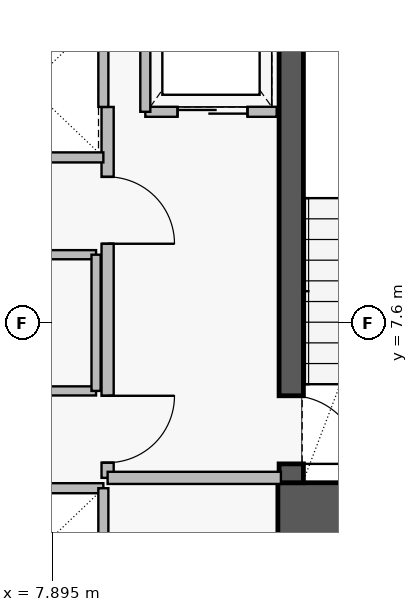
"""IFC4 building model, lengths in metres.
Left out: names, types, materials, properties, quantities, classifications, styles, units other than length and angle.
Written with IfcOpenShell. Run it as: python <this file> out.ifc"""

import sys

from ifc_helpers import new_model, si_unit, direction, frame, frame_2d, origin, place, context, subcontext, project, spatial, rectangle, extrude, element, fill, save


model = new_model("IFC4")
c1 = context("Model", 3, precision=1e-05, world=origin(), true_north=direction((0.0, 1.0)))
c2 = subcontext(c1, "Body", "Model", "MODEL_VIEW")
j1 = project(units=[si_unit("LENGTHUNIT", "METRE"), si_unit("PLANEANGLEUNIT", "RADIAN")], contexts=[c1])
p1 = place(None, origin())
s1 = spatial("IfcSite", under=j1, at=p1, CompositionType="ELEMENT")
p2 = place(p1, origin())
s2 = spatial("IfcBuilding", under=s1, at=p2, CompositionType="ELEMENT")
p3 = place(p2, frame((0.0, 0.0, 38.55)))
s3 = spatial("IfcBuildingStorey", under=s2, at=p3, CompositionType="ELEMENT", Elevation=38.55)
p4 = place(p3, frame((11.6, 4.52, 0.0), z_axis=(0.0, 0.0, 1.0), x_axis=(1.0, 0.0, 0.0)))
e1 = element("IfcWall", 1, at=p4, inside=s3, PredefinedType="SHEAR", context=c2, shape_type="SweptSolid", body=[
    extrude(rectangle(XDim=4.71, YDim=0.9, at=frame_2d((2.355, 0.0))), origin(), (0.0, 0.0, 1.0), 3.46),
])
p5 = place(p3, frame((11.82, 13.93, 0.0), z_axis=(0.0, 0.0, 1.0), x_axis=(0.0, -1.0, 0.0)))
e2 = element("IfcWall", 2, at=p5, inside=s3, PredefinedType="SHEAR", context=c2, shape_type="SweptSolid", body=[
    extrude(rectangle(XDim=8.96, YDim=0.4, at=frame_2d((4.48, 0.0))), origin(), (0.0, 0.0, 1.0), 3.46),
])
p6 = place(p5, frame((7.53, 0.0, 0.0)))
e3 = element("IfcOpeningElement", 3, at=p6, cuts=e2, PredefinedType="OPENING", context=c2, shape_type="SweptSolid", body=[
    extrude(rectangle(XDim=1.12, YDim=2.22, at=frame_2d((0.56, 1.11))), frame((0.0, 0.21, 0.0), z_axis=(0.0, -1.0, 0.0), x_axis=(1.0, 0.0, 0.0)), (0.0, 0.0, 1.0), 0.42),
])
p7 = place(p3, frame((8.8, 11.15, 0.0), z_axis=(0.0, 0.0, 1.0), x_axis=(0.0, -1.0, 0.0)))
e4 = element("IfcWall", 4, at=p7, inside=s3, PredefinedType="PARTITIONING", context=c2, shape_type="SweptSolid", body=[
    extrude(rectangle(XDim=6.1, YDim=0.2, at=frame_2d((3.05, 0.0))), origin(), (0.0, 0.0, 1.0), 3.43),
])
p8 = place(p7, frame((1.15, 0.0, 0.0)))
e5 = element("IfcOpeningElement", 5, at=p8, cuts=e4, PredefinedType="OPENING", context=c2, shape_type="SweptSolid", body=[
    extrude(rectangle(XDim=1.1, YDim=2.2, at=frame_2d((0.55, 1.1))), frame((0.0, 0.11, 0.0), z_axis=(0.0, -1.0, 0.0), x_axis=(1.0, 0.0, 0.0)), (0.0, 0.0, 1.0), 0.22),
])
p9 = place(p7, frame((4.75, 0.0, 0.0)))
e6 = element("IfcOpeningElement", 6, at=p9, cuts=e4, PredefinedType="OPENING", context=c2, shape_type="SweptSolid", body=[
    extrude(rectangle(XDim=1.1, YDim=2.2, at=frame_2d((0.55, 1.1))), frame((0.0, 0.11, 0.0), z_axis=(0.0, -1.0, 0.0), x_axis=(1.0, 0.0, 0.0)), (0.0, 0.0, 1.0), 0.22),
])
p10 = place(p3, frame((9.42, 11.07, 0.0), z_axis=(0.0, 0.0, 1.0), x_axis=(1.0, 0.0, 0.0)))
e7 = element("IfcWall", 7, at=p10, inside=s3, PredefinedType="PARTITIONING", context=c2, shape_type="SweptSolid", body=[
    extrude(rectangle(XDim=2.16, YDim=0.165, at=frame_2d((1.08, 0.0))), origin(), (0.0, 0.0, 1.0), 3.43),
])
p11 = place(p10, frame((0.53, 0.0, 0.0)))
e8 = element("IfcOpeningElement", 8, at=p11, cuts=e7, PredefinedType="OPENING", context=c2, shape_type="SweptSolid", body=[
    extrude(rectangle(XDim=1.15, YDim=2.25, at=frame_2d((0.575, 1.125))), frame((0.0, 0.093, 0.0), z_axis=(0.0, -1.0, 0.0), x_axis=(1.0, 0.0, 0.0)), (0.0, 0.0, 1.0), 0.185),
])
p12 = place(p3, frame((6.14, 8.72, 0.0), z_axis=(0.0, 0.0, 1.0), x_axis=(1.0, 0.0, 0.0)))
e9 = element("IfcWall", 9, at=p12, inside=s3, PredefinedType="PARTITIONING", context=c2, shape_type="SweptSolid", body=[
    extrude(rectangle(XDim=2.47, YDim=0.15, at=frame_2d((1.235, 0.0))), origin(), (0.0, 0.0, 1.0), 3.43),
])
p13 = place(p12, frame((0.785, 0.0, 0.0)))
e10 = element("IfcOpeningElement", 10, at=p13, cuts=e9, PredefinedType="OPENING", context=c2, shape_type="SweptSolid", body=[
    extrude(rectangle(XDim=0.9, YDim=2.15, at=frame_2d((0.45, 1.075))), frame((0.0, 0.085, 0.0), z_axis=(0.0, -1.0, 0.0), x_axis=(1.0, 0.0, 0.0)), (0.0, 0.0, 1.0), 0.17),
])
p14 = place(p3, frame((8.8, 5.05, 0.0), z_axis=(0.0, 0.0, 1.0), x_axis=(1.0, 0.0, 0.0)))
e11 = element("IfcWall", 11, at=p14, inside=s3, PredefinedType="PARTITIONING", context=c2, shape_type="SweptSolid", body=[
    extrude(rectangle(XDim=2.85, YDim=0.2, at=frame_2d((1.425, 0.0))), origin(), (0.0, 0.0, 1.0), 3.43),
])
p15 = place(p3, frame((9.42, 11.07, 0.0), z_axis=(0.0, 0.0, 1.0), x_axis=(0.0, 1.0, 0.0)))
e12 = element("IfcWall", 12, at=p15, inside=s3, PredefinedType="PARTITIONING", context=c2, shape_type="SweptSolid", body=[
    extrude(rectangle(XDim=2.96, YDim=0.165, at=frame_2d((1.48, 0.0))), origin(), (0.0, 0.0, 1.0), 3.43),
])
p16 = place(p3, frame((6.25, 4.88, 0.0), z_axis=(0.0, 0.0, 1.0), x_axis=(1.0, 0.0, 0.0)))
e13 = element("IfcWall", 13, at=p16, inside=s3, PredefinedType="PARTITIONING", context=c2, shape_type="SweptSolid", body=[
    extrude(rectangle(XDim=2.48, YDim=0.165, at=frame_2d((1.24, 0.0))), origin(), (0.0, 0.0, 1.0), 3.43),
])
p17 = place(p3, frame((8.73, 2.52, 0.0), z_axis=(0.0, 0.0, 1.0), x_axis=(0.0, 1.0, 0.0)))
e14 = element("IfcWall", 14, at=p17, inside=s3, PredefinedType="PARTITIONING", context=c2, shape_type="SweptSolid", body=[
    extrude(rectangle(XDim=2.36, YDim=0.165, at=frame_2d((1.18, 0.0))), origin(), (0.0, 0.0, 1.0), 3.43),
])
p18 = place(p3, frame((6.25, 10.32, 0.0), z_axis=(0.0, 0.0, 1.0), x_axis=(1.0, 0.0, 0.0)))
e15 = element("IfcWall", 15, at=p18, inside=s3, PredefinedType="PARTITIONING", context=c2, shape_type="SweptSolid", body=[
    extrude(rectangle(XDim=2.48, YDim=0.165, at=frame_2d((1.24, 0.0))), origin(), (0.0, 0.0, 1.0), 3.43),
])
p19 = place(p3, frame((8.73, 11.15, 0.0), z_axis=(0.0, 0.0, 1.0), x_axis=(0.0, 1.0, 0.0)))
e16 = element("IfcWall", 16, at=p19, inside=s3, PredefinedType="PARTITIONING", context=c2, shape_type="SweptSolid", body=[
    extrude(rectangle(XDim=1.53, YDim=0.165, at=frame_2d((0.765, 0.0))), origin(), (0.0, 0.0, 1.0), 3.43),
])
p20 = place(p3, frame((6.14, 6.48, 0.0), z_axis=(0.0, 0.0, 1.0), x_axis=(1.0, 0.0, 0.0)))
e17 = element("IfcWall", 17, at=p20, inside=s3, PredefinedType="PARTITIONING", context=c2, shape_type="SweptSolid", body=[
    extrude(rectangle(XDim=2.47, YDim=0.15, at=frame_2d((1.235, 0.0))), origin(), (0.0, 0.0, 1.0), 3.43),
])
p21 = place(p3, frame((8.61, 6.48, 0.0), z_axis=(0.0, 0.0, 1.0), x_axis=(0.0, 1.0, 0.0)))
e18 = element("IfcWall", 18, at=p21, inside=s3, PredefinedType="PARTITIONING", context=c2, shape_type="SweptSolid", body=[
    extrude(rectangle(XDim=2.24, YDim=0.15, at=frame_2d((1.12, 0.0))), origin(), (0.0, 0.0, 1.0), 3.43),
])
p22 = place(p6, origin())
e19 = element("IfcDoor", 19, at=p22, inside=s3, OperationType="SINGLE_SWING_RIGHT", PredefinedType="DOOR", context=c2, shape_type="SweptSolid", body=[
    extrude(rectangle(XDim=1.12, YDim=2.22, at=frame_2d((0.56, 1.11))), frame((0.0, 0.025, 0.0), z_axis=(0.0, -1.0, 0.0), x_axis=(1.0, 0.0, 0.0)), (0.0, 0.0, 1.0), 0.05),
])
fill(e3, e19)
p23 = place(p8, origin())
e20 = element("IfcDoor", 20, at=p23, inside=s3, OperationType="SINGLE_SWING_RIGHT", PredefinedType="DOOR", context=c2, shape_type="SweptSolid", body=[
    extrude(rectangle(XDim=1.1, YDim=2.2, at=frame_2d((0.55, 1.1))), frame((0.0, 0.025, 0.0), z_axis=(0.0, -1.0, 0.0), x_axis=(1.0, 0.0, 0.0)), (0.0, 0.0, 1.0), 0.05),
])
fill(e5, e20)
p24 = place(p9, origin())
e21 = element("IfcDoor", 21, at=p24, inside=s3, OperationType="SINGLE_SWING_LEFT", PredefinedType="DOOR", context=c2, shape_type="SweptSolid", body=[
    extrude(rectangle(XDim=1.1, YDim=2.2, at=frame_2d((0.55, 1.1))), frame((0.0, 0.025, 0.0), z_axis=(0.0, -1.0, 0.0), x_axis=(1.0, 0.0, 0.0)), (0.0, 0.0, 1.0), 0.05),
])
fill(e6, e21)
p25 = place(p11, origin())
e22 = element("IfcDoor", 22, at=p25, inside=s3, OperationType="SLIDING_TO_LEFT", PredefinedType="DOOR", context=c2, shape_type="SweptSolid", body=[
    extrude(rectangle(XDim=1.15, YDim=2.25, at=frame_2d((0.575, 1.125))), frame((0.0, 0.025, 0.0), z_axis=(0.0, -1.0, 0.0), x_axis=(1.0, 0.0, 0.0)), (0.0, 0.0, 1.0), 0.05),
])
fill(e8, e22)
save(model, sys.argv[1])
